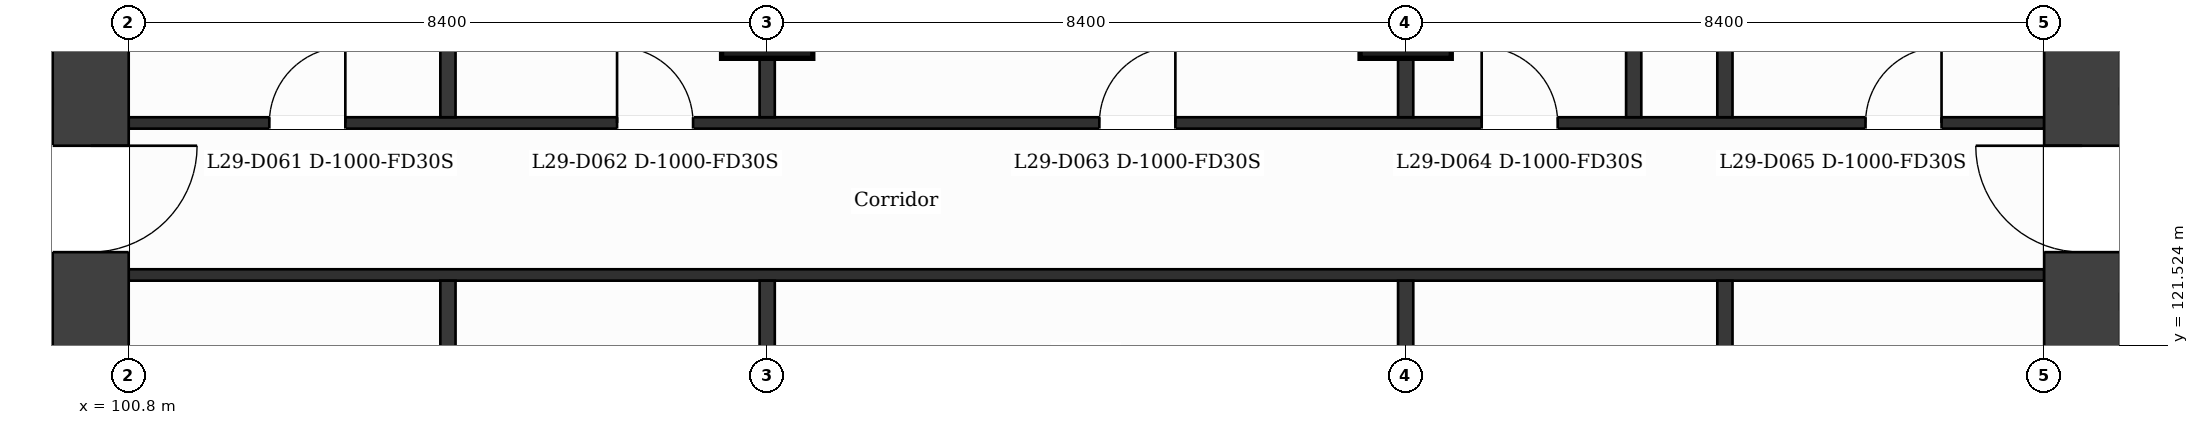
"""IFC4 building model, lengths in metres.
Left out: names, types, materials, properties, quantities, classifications, styles, units other than length and angle.
Written with IfcOpenShell. Run it as: python <this file> out.ifc"""

import sys

from ifc_helpers import new_model, si_unit, direction, frame, frame_2d, origin, origin_2d, place, context, subcontext, project, spatial, rectangle, extrude, element, fill, save


model = new_model("IFC4")
c1 = context("Model", 3, precision=1e-05, world=origin(), true_north=direction((0.0, 1.0)))
c2 = subcontext(c1, "Body", "Model", "MODEL_VIEW")
j1 = project(units=[si_unit("LENGTHUNIT", "METRE"), si_unit("PLANEANGLEUNIT", "RADIAN")], contexts=[c1])
p1 = place(None, origin())
s1 = spatial("IfcSite", under=j1, at=p1, CompositionType="ELEMENT")
p2 = place(p1, origin())
s2 = spatial("IfcBuilding", under=s1, at=p2, CompositionType="ELEMENT")
p3 = place(p2, frame((0.0, 0.0, 124.3)))
s3 = spatial("IfcBuildingStorey", under=s2, at=p3, CompositionType="ELEMENT", Elevation=124.3)
p4 = place(p3, frame((100.3, 131.9, 0.0), z_axis=(0.0, 0.0, 1.0), x_axis=(0.0, -1.0, 0.0)))
e1 = element("IfcWall", 1, at=p4, inside=s3, PredefinedType="SHEAR", context=c2, shape_type="SweptSolid", body=[
    extrude(rectangle(XDim=21.0, YDim=1.0, at=frame_2d((10.5, 0.0))), origin(), (0.0, 0.0, 1.0), 3.7),
])
p5 = place(p4, frame((7.75, 0.0, 0.0)))
e2 = element("IfcOpeningElement", 2, at=p5, cuts=e1, PredefinedType="OPENING", context=c2, shape_type="SweptSolid", body=[
    extrude(rectangle(XDim=1.4, YDim=2.1, at=frame_2d((0.7, 1.05))), frame((0.0, 0.51, 0.0), z_axis=(0.0, -1.0, 0.0), x_axis=(1.0, 0.0, 0.0)), (0.0, 0.0, 1.0), 1.02),
])
p6 = place(p3, frame((126.5, 110.9, 0.0), z_axis=(0.0, 0.0, 1.0), x_axis=(0.0, 1.0, 0.0)))
e3 = element("IfcWall", 3, at=p6, inside=s3, PredefinedType="SHEAR", context=c2, shape_type="SweptSolid", body=[
    extrude(rectangle(XDim=21.0, YDim=1.0, at=frame_2d((10.5, 0.0))), origin(), (0.0, 0.0, 1.0), 3.7),
])
p7 = place(p6, frame((11.85, 0.0, 0.0)))
e4 = element("IfcOpeningElement", 4, at=p7, cuts=e3, PredefinedType="OPENING", context=c2, shape_type="SweptSolid", body=[
    extrude(rectangle(XDim=1.4, YDim=2.1, at=frame_2d((0.7, 1.05))), frame((0.0, 0.51, 0.0), z_axis=(0.0, -1.0, 0.0), x_axis=(1.0, 0.0, 0.0)), (0.0, 0.0, 1.0), 1.02),
])
for number, where, z_axis, x_axis in (
    (5, (109.2, 125.9, 0.0), (0.0, 0.0, 1.0), (1.0, 0.0, 0.0)),
    (6, (117.6, 125.9, 0.0), (0.0, 0.0, 1.0), (1.0, 0.0, 0.0)),
):
    element("IfcColumn", number, at=place(p3, frame(where, z_axis=z_axis, x_axis=x_axis)), inside=s3, PredefinedType="COLUMN", context=c2, shape_type="SweptSolid", body=[
        extrude(rectangle(XDim=1.2, YDim=1.2, at=origin_2d()), origin(), (0.0, 0.0, 1.0), 3.7),
    ])
p8 = place(p3, frame((95.227, 122.1, 0.0), z_axis=(0.0, 0.0, 1.0), x_axis=(1.0, 0.0, 0.0)))
e7 = element("IfcWall", 7, at=p8, inside=s3, PredefinedType="PARTITIONING", context=c2, shape_type="SweptSolid", body=[
    extrude(rectangle(XDim=4.573, YDim=0.2, at=frame_2d((2.287, 0.0))), origin(), (0.0, 0.0, 1.0), 3.38),
])
p9 = place(p8, frame((2.134, 0.0, 0.0)))
e8 = element("IfcOpeningElement", 8, at=p9, cuts=e7, PredefinedType="OPENING", context=c2, shape_type="SweptSolid", body=[
    extrude(rectangle(XDim=0.9, YDim=2.1, at=frame_2d((0.45, 1.05))), frame((0.0, 0.11, 0.0), z_axis=(0.0, -1.0, 0.0), x_axis=(1.0, 0.0, 0.0)), (0.0, 0.0, 1.0), 0.22),
])
p10 = place(p3, frame((100.8, 122.45, 0.0), z_axis=(0.0, 0.0, 1.0), x_axis=(1.0, 0.0, 0.0)))
e9 = element("IfcWall", 9, at=p10, inside=s3, PredefinedType="PARTITIONING", context=c2, shape_type="SweptSolid", body=[
    extrude(rectangle(XDim=25.2, YDim=0.15, at=frame_2d((12.6, 0.0))), origin(), (0.0, 0.0, 1.0), 3.38),
])
p11 = place(p3, frame((100.8, 124.45, 0.0), z_axis=(0.0, 0.0, 1.0), x_axis=(1.0, 0.0, 0.0)))
e10 = element("IfcWall", 10, at=p11, inside=s3, PredefinedType="PARTITIONING", context=c2, shape_type="SweptSolid", body=[
    extrude(rectangle(XDim=25.2, YDim=0.15, at=frame_2d((12.6, 0.0))), origin(), (0.0, 0.0, 1.0), 3.38),
])
p12 = place(p11, frame((1.85, 0.0, 0.0)))
e11 = element("IfcOpeningElement", 11, at=p12, cuts=e10, PredefinedType="OPENING", context=c2, shape_type="SweptSolid", body=[
    extrude(rectangle(XDim=1.0, YDim=2.1, at=frame_2d((0.5, 1.05))), frame((0.0, 0.085, 0.0), z_axis=(0.0, -1.0, 0.0), x_axis=(1.0, 0.0, 0.0)), (0.0, 0.0, 1.0), 0.17),
])
p13 = place(p11, frame((6.425, 0.0, 0.0)))
e12 = element("IfcOpeningElement", 12, at=p13, cuts=e10, PredefinedType="OPENING", context=c2, shape_type="SweptSolid", body=[
    extrude(rectangle(XDim=1.0, YDim=2.1, at=frame_2d((0.5, 1.05))), frame((0.0, 0.085, 0.0), z_axis=(0.0, -1.0, 0.0), x_axis=(1.0, 0.0, 0.0)), (0.0, 0.0, 1.0), 0.17),
])
p14 = place(p11, frame((12.77, 0.0, 0.0)))
e13 = element("IfcOpeningElement", 13, at=p14, cuts=e10, PredefinedType="OPENING", context=c2, shape_type="SweptSolid", body=[
    extrude(rectangle(XDim=1.0, YDim=2.1, at=frame_2d((0.5, 1.05))), frame((0.0, 0.085, 0.0), z_axis=(0.0, -1.0, 0.0), x_axis=(1.0, 0.0, 0.0)), (0.0, 0.0, 1.0), 0.17),
])
p15 = place(p11, frame((17.8, 0.0, 0.0)))
e14 = element("IfcOpeningElement", 14, at=p15, cuts=e10, PredefinedType="OPENING", context=c2, shape_type="SweptSolid", body=[
    extrude(rectangle(XDim=1.0, YDim=2.1, at=frame_2d((0.5, 1.05))), frame((0.0, 0.085, 0.0), z_axis=(0.0, -1.0, 0.0), x_axis=(1.0, 0.0, 0.0)), (0.0, 0.0, 1.0), 0.17),
])
p16 = place(p11, frame((22.85, 0.0, 0.0)))
e15 = element("IfcOpeningElement", 15, at=p16, cuts=e10, PredefinedType="OPENING", context=c2, shape_type="SweptSolid", body=[
    extrude(rectangle(XDim=1.0, YDim=2.1, at=frame_2d((0.5, 1.05))), frame((0.0, 0.085, 0.0), z_axis=(0.0, -1.0, 0.0), x_axis=(1.0, 0.0, 0.0)), (0.0, 0.0, 1.0), 0.17),
])
p17 = place(p3, frame((127.0, 124.8, 0.0), z_axis=(0.0, 0.0, 1.0), x_axis=(1.0, 0.0, 0.0)))
e16 = element("IfcWall", 16, at=p17, inside=s3, PredefinedType="PARTITIONING", context=c2, shape_type="SweptSolid", body=[
    extrude(rectangle(XDim=4.649, YDim=0.2, at=frame_2d((2.324, 0.0))), origin(), (0.0, 0.0, 1.0), 3.38),
])
p18 = place(p17, frame((0.743, 0.0, 0.0)))
e17 = element("IfcOpeningElement", 17, at=p18, cuts=e16, PredefinedType="OPENING", context=c2, shape_type="SweptSolid", body=[
    extrude(rectangle(XDim=1.1, YDim=2.1, at=frame_2d((0.55, 1.05))), frame((0.0, 0.11, 0.0), z_axis=(0.0, -1.0, 0.0), x_axis=(1.0, 0.0, 0.0)), (0.0, 0.0, 1.0), 0.22),
])
p19 = place(p3, frame((105.0, 109.075, 0.0), z_axis=(0.0, 0.0, 1.0), x_axis=(0.0, 1.0, 0.0)))
e18 = element("IfcWall", 18, at=p19, inside=s3, PredefinedType="PARTITIONING", context=c2, shape_type="SweptSolid", body=[
    extrude(rectangle(XDim=13.3, YDim=0.2, at=frame_2d((6.65, 0.0))), origin(), (0.0, 0.0, 1.0), 3.38),
])
p20 = place(p3, frame((105.0, 124.525, 0.0), z_axis=(0.0, 0.0, 1.0), x_axis=(0.0, 1.0, 0.0)))
e19 = element("IfcWall", 19, at=p20, inside=s3, PredefinedType="PARTITIONING", context=c2, shape_type="SweptSolid", body=[
    extrude(rectangle(XDim=9.2, YDim=0.2, at=frame_2d((4.6, 0.0))), origin(), (0.0, 0.0, 1.0), 3.38),
])
p21 = place(p3, frame((109.2, 109.075, 0.0), z_axis=(0.0, 0.0, 1.0), x_axis=(0.0, 1.0, 0.0)))
e20 = element("IfcWall", 20, at=p21, inside=s3, PredefinedType="PARTITIONING", context=c2, shape_type="SweptSolid", body=[
    extrude(rectangle(XDim=13.3, YDim=0.2, at=frame_2d((6.65, 0.0))), origin(), (0.0, 0.0, 1.0), 3.38),
])
p22 = place(p3, frame((109.2, 124.525, 0.0), z_axis=(0.0, 0.0, 1.0), x_axis=(0.0, 1.0, 0.0)))
e21 = element("IfcWall", 21, at=p22, inside=s3, PredefinedType="PARTITIONING", context=c2, shape_type="SweptSolid", body=[
    extrude(rectangle(XDim=9.2, YDim=0.2, at=frame_2d((4.6, 0.0))), origin(), (0.0, 0.0, 1.0), 3.38),
])
p23 = place(p3, frame((117.6, 109.075, 0.0), z_axis=(0.0, 0.0, 1.0), x_axis=(0.0, 1.0, 0.0)))
e22 = element("IfcWall", 22, at=p23, inside=s3, PredefinedType="PARTITIONING", context=c2, shape_type="SweptSolid", body=[
    extrude(rectangle(XDim=13.3, YDim=0.2, at=frame_2d((6.65, 0.0))), origin(), (0.0, 0.0, 1.0), 3.38),
])
p24 = place(p3, frame((117.6, 124.525, 0.0), z_axis=(0.0, 0.0, 1.0), x_axis=(0.0, 1.0, 0.0)))
e23 = element("IfcWall", 23, at=p24, inside=s3, PredefinedType="PARTITIONING", context=c2, shape_type="SweptSolid", body=[
    extrude(rectangle(XDim=9.2, YDim=0.2, at=frame_2d((4.6, 0.0))), origin(), (0.0, 0.0, 1.0), 3.38),
])
p25 = place(p3, frame((120.6, 124.525, 0.0), z_axis=(0.0, 0.0, 1.0), x_axis=(0.0, 1.0, 0.0)))
e24 = element("IfcWall", 24, at=p25, inside=s3, PredefinedType="PARTITIONING", context=c2, shape_type="SweptSolid", body=[
    extrude(rectangle(XDim=5.825, YDim=0.2, at=frame_2d((2.913, 0.0))), origin(), (0.0, 0.0, 1.0), 3.38),
])
p26 = place(p3, frame((121.8, 109.075, 0.0), z_axis=(0.0, 0.0, 1.0), x_axis=(0.0, 1.0, 0.0)))
e25 = element("IfcWall", 25, at=p26, inside=s3, PredefinedType="PARTITIONING", context=c2, shape_type="SweptSolid", body=[
    extrude(rectangle(XDim=13.3, YDim=0.2, at=frame_2d((6.65, 0.0))), origin(), (0.0, 0.0, 1.0), 3.38),
])
p27 = place(p3, frame((121.8, 124.525, 0.0), z_axis=(0.0, 0.0, 1.0), x_axis=(0.0, 1.0, 0.0)))
e26 = element("IfcWall", 26, at=p27, inside=s3, PredefinedType="PARTITIONING", context=c2, shape_type="SweptSolid", body=[
    extrude(rectangle(XDim=9.2, YDim=0.2, at=frame_2d((4.6, 0.0))), origin(), (0.0, 0.0, 1.0), 3.38),
])
p28 = place(p12, origin())
e27 = element("IfcDoor", 27, at=p28, inside=s3, OperationType="SINGLE_SWING_RIGHT", PredefinedType="DOOR", context=c2, shape_type="SweptSolid", body=[
    extrude(rectangle(XDim=1.0, YDim=2.1, at=frame_2d((0.5, 1.05))), frame((0.0, 0.025, 0.0), z_axis=(0.0, -1.0, 0.0), x_axis=(1.0, 0.0, 0.0)), (0.0, 0.0, 1.0), 0.05),
])
fill(e11, e27)
p29 = place(p13, origin())
e28 = element("IfcDoor", 28, at=p29, inside=s3, OperationType="SINGLE_SWING_LEFT", PredefinedType="DOOR", context=c2, shape_type="SweptSolid", body=[
    extrude(rectangle(XDim=1.0, YDim=2.1, at=frame_2d((0.5, 1.05))), frame((0.0, 0.025, 0.0), z_axis=(0.0, -1.0, 0.0), x_axis=(1.0, 0.0, 0.0)), (0.0, 0.0, 1.0), 0.05),
])
fill(e12, e28)
p30 = place(p14, origin())
e29 = element("IfcDoor", 29, at=p30, inside=s3, OperationType="SINGLE_SWING_RIGHT", PredefinedType="DOOR", context=c2, shape_type="SweptSolid", body=[
    extrude(rectangle(XDim=1.0, YDim=2.1, at=frame_2d((0.5, 1.05))), frame((0.0, 0.025, 0.0), z_axis=(0.0, -1.0, 0.0), x_axis=(1.0, 0.0, 0.0)), (0.0, 0.0, 1.0), 0.05),
])
fill(e13, e29)
p31 = place(p15, origin())
e30 = element("IfcDoor", 30, at=p31, inside=s3, OperationType="SINGLE_SWING_LEFT", PredefinedType="DOOR", context=c2, shape_type="SweptSolid", body=[
    extrude(rectangle(XDim=1.0, YDim=2.1, at=frame_2d((0.5, 1.05))), frame((0.0, 0.025, 0.0), z_axis=(0.0, -1.0, 0.0), x_axis=(1.0, 0.0, 0.0)), (0.0, 0.0, 1.0), 0.05),
])
fill(e14, e30)
p32 = place(p16, origin())
e31 = element("IfcDoor", 31, at=p32, inside=s3, OperationType="SINGLE_SWING_RIGHT", PredefinedType="DOOR", context=c2, shape_type="SweptSolid", body=[
    extrude(rectangle(XDim=1.0, YDim=2.1, at=frame_2d((0.5, 1.05))), frame((0.0, 0.025, 0.0), z_axis=(0.0, -1.0, 0.0), x_axis=(1.0, 0.0, 0.0)), (0.0, 0.0, 1.0), 0.05),
])
fill(e15, e31)
p33 = place(p5, origin())
e32 = element("IfcDoor", 32, at=p33, inside=s3, OperationType="SINGLE_SWING_LEFT", PredefinedType="DOOR", context=c2, shape_type="SweptSolid", body=[
    extrude(rectangle(XDim=1.4, YDim=2.1, at=frame_2d((0.7, 1.05))), frame((0.0, 0.025, 0.0), z_axis=(0.0, -1.0, 0.0), x_axis=(1.0, 0.0, 0.0)), (0.0, 0.0, 1.0), 0.05),
])
fill(e2, e32)
p34 = place(p7, origin())
e33 = element("IfcDoor", 33, at=p34, inside=s3, OperationType="SINGLE_SWING_RIGHT", PredefinedType="DOOR", context=c2, shape_type="SweptSolid", body=[
    extrude(rectangle(XDim=1.4, YDim=2.1, at=frame_2d((0.7, 1.05))), frame((0.0, 0.025, 0.0), z_axis=(0.0, -1.0, 0.0), x_axis=(1.0, 0.0, 0.0)), (0.0, 0.0, 1.0), 0.05),
])
fill(e4, e33)
save(model, sys.argv[1])
